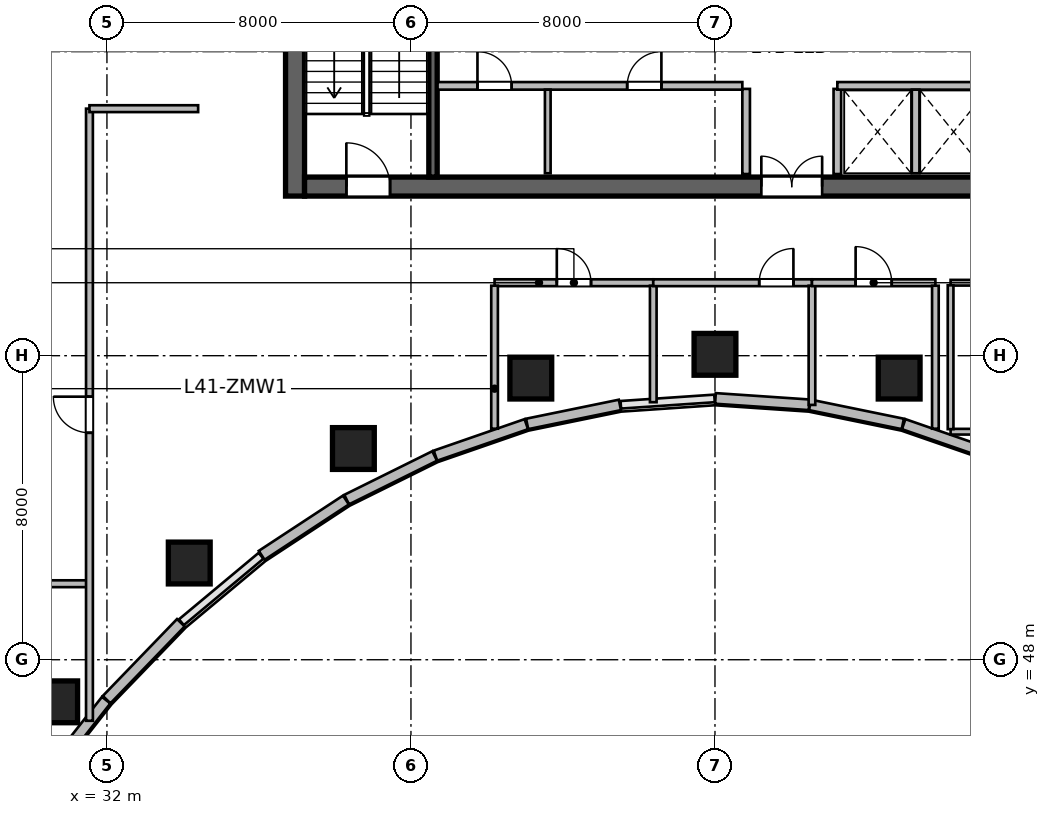
"""IFC4 building model, lengths in metres.
Left out: names, types, materials, properties, quantities, classifications, styles, units other than length and angle.
Written with IfcOpenShell. Run it as: python <this file> out.ifc"""

import sys

from ifc_helpers import new_model, si_unit, direction, frame, frame_2d, origin, origin_2d, place, context, subcontext, project, spatial, rectangle, circle, extrude, source, transform, mapped, element, fill, save


model = new_model("IFC4")
c1 = context("Model", 3, precision=1e-05, world=origin(), true_north=direction((0.0, 1.0)))
c2 = subcontext(c1, "Body", "Model", "MODEL_VIEW")
j1 = project(units=[si_unit("LENGTHUNIT", "METRE"), si_unit("PLANEANGLEUNIT", "RADIAN")], contexts=[c1])
p1 = place(None, origin())
s1 = spatial("IfcSite", under=j1, at=p1, CompositionType="ELEMENT")
p2 = place(p1, origin())
s2 = spatial("IfcBuilding", under=s1, at=p2, CompositionType="ELEMENT")
p3 = place(p2, frame((0.0, 0.0, 170.1)))
s3 = spatial("IfcBuildingStorey", under=s2, at=p3, CompositionType="ELEMENT", Elevation=170.1)
m1 = source(origin(), c2, "Body", "SweptSolid", [
    extrude(rectangle(XDim=12.0, YDim=0.5, at=frame_2d((6.0, 0.0))), origin(), (0.0, 0.0, 1.0), 3.9),
])
p4 = place(p3, frame((36.95, 60.2, 0.0), z_axis=(0.0, 0.0, 1.0), x_axis=(0.0, 1.0, 0.0)))
e1 = element("IfcWall", 1, at=p4, inside=s3, PredefinedType="SHEAR", context=c2, shape_type="MappedRepresentation", body=[
    mapped(m1, transform((0.0, 0.0, 0.0), scale=1.0)),
])
m2 = source(origin(), c2, "Body", "SweptSolid", [
    extrude(rectangle(XDim=21.6, YDim=0.5, at=frame_2d((10.8, 0.0))), origin(), (0.0, 0.0, 1.0), 3.9),
])
p5 = place(p3, frame((37.2, 60.45, 0.0), z_axis=(0.0, 0.0, 1.0), x_axis=(1.0, 0.0, 0.0)))
e2 = element("IfcWall", 2, at=p5, inside=s3, PredefinedType="SHEAR", context=c2, shape_type="MappedRepresentation", body=[
    mapped(m2, transform((0.0, 0.0, 0.0), scale=1.0)),
])
p6 = place(p5, frame((1.1, 0.0, 0.0)))
e3 = element("IfcOpeningElement", 3, at=p6, cuts=e2, PredefinedType="OPENING", context=c2, shape_type="SweptSolid", body=[
    extrude(rectangle(XDim=1.15, YDim=2.15, at=frame_2d((0.575, 1.075))), frame((0.0, 0.26, 0.0), z_axis=(0.0, -1.0, 0.0), x_axis=(1.0, 0.0, 0.0)), (0.0, 0.0, 1.0), 0.52),
])
p7 = place(p5, frame((19.5, 0.0, 0.0)))
e4 = element("IfcOpeningElement", 4, at=p7, cuts=e2, PredefinedType="OPENING", context=c2, shape_type="SweptSolid", body=[
    extrude(rectangle(XDim=0.9, YDim=2.1, at=frame_2d((0.45, 1.05))), frame((0.0, 0.26, 0.0), z_axis=(0.0, -1.0, 0.0), x_axis=(1.0, 0.0, 0.0)), (0.0, 0.0, 1.0), 0.52),
])
p8 = place(p5, frame((12.02, 0.0, 0.0)))
e5 = element("IfcOpeningElement", 5, at=p8, cuts=e2, PredefinedType="OPENING", context=c2, shape_type="SweptSolid", body=[
    extrude(rectangle(XDim=1.6, YDim=2.15, at=frame_2d((0.8, 1.075))), frame((0.0, 0.26, 0.0), z_axis=(0.0, -1.0, 0.0), x_axis=(1.0, 0.0, 0.0)), (0.0, 0.0, 1.0), 0.52),
])
m3 = source(origin(), c2, "Body", "SweptSolid", [
    extrude(rectangle(XDim=11.0, YDim=0.22, at=frame_2d((5.5, 0.0))), origin(), (0.0, 0.0, 1.0), 3.9),
])
p9 = place(p3, frame((40.58, 60.7, 0.0), z_axis=(0.0, 0.0, 1.0), x_axis=(0.0, 1.0, 0.0)))
e6 = element("IfcWall", 6, at=p9, inside=s3, PredefinedType="SHEAR", context=c2, shape_type="MappedRepresentation", body=[
    mapped(m3, transform((0.0, 0.0, 0.0), scale=1.0)),
])
m4 = source(origin(), c2, "Body", "SweptSolid", [
    extrude(circle(Radius=0.55, at=origin_2d()), origin(), (0.0, 0.0, 1.0), 3.9),
])
for number, where, z_axis, x_axis in (
    (7, (30.677, 46.892, 0.0), (0.0, 0.0, 1.0), (-0.571, 0.821, 0.0)),
    (8, (34.166, 50.545, 0.0), (0.0, 0.0, 1.0), (-0.436, 0.9, 0.0)),
    (9, (38.485, 53.558, 0.0), (0.0, 0.0, 1.0), (-0.289, 0.957, 0.0)),
    (10, (43.154, 55.411, 0.0), (0.0, 0.0, 1.0), (-0.143, 0.99, 0.0)),
    (11, (48.0, 56.036, 0.0), (0.0, 0.0, 1.0), (0.0, 1.0, 0.0)),
    (12, (52.846, 55.411, 0.0), (0.0, 0.0, 1.0), (0.143, 0.99, 0.0)),
):
    element("IfcColumn", number, at=place(p3, frame(where, z_axis=z_axis, x_axis=x_axis)), inside=s3, PredefinedType="COLUMN", context=c2, shape_type="MappedRepresentation", body=[
        mapped(m4, transform((0.0, 0.0, 0.0), scale=1.0)),
    ])
m5 = source(origin(), c2, "Body", "SweptSolid", [
    extrude(rectangle(XDim=2.53, YDim=0.28, at=frame_2d((1.265, 0.0))), origin(), (0.0, 0.0, 1.0), 3.65),
])
p10 = place(p3, frame((55.355, 53.37, 0.0), z_axis=(0.0, 0.0, 1.0), x_axis=(-0.944872429646, 0.327438683872, 0.0)))
e13 = element("IfcWall", 13, at=p10, inside=s3, PredefinedType="SOLIDWALL", context=c2, shape_type="MappedRepresentation", body=[
    mapped(m5, transform((0.0, 0.0, 0.0), scale=1.0)),
])
m6 = source(origin(), c2, "Body", "SweptSolid", [
    extrude(rectangle(XDim=2.491, YDim=0.28, at=frame_2d((1.246, 0.0))), origin(), (0.0, 0.0, 1.0), 3.65),
])
p11 = place(p3, frame((52.942, 54.205, 0.0), z_axis=(0.0, 0.0, 1.0), x_axis=(-0.979630885979, 0.200806691214, 0.0)))
e14 = element("IfcWall", 14, at=p11, inside=s3, PredefinedType="SOLIDWALL", context=c2, shape_type="MappedRepresentation", body=[
    mapped(m6, transform((0.0, 0.0, 0.0), scale=1.0)),
])
m7 = source(origin(), c2, "Body", "SweptSolid", [
    extrude(rectangle(XDim=2.471, YDim=0.28, at=frame_2d((1.236, 0.0))), origin(), (0.0, 0.0, 1.0), 3.65),
])
p12 = place(p3, frame((50.478, 54.708, 0.0), z_axis=(0.0, 0.0, 1.0), x_axis=(-0.997708006929, 0.067666335123, 0.0)))
e15 = element("IfcWall", 15, at=p12, inside=s3, PredefinedType="SOLIDWALL", context=c2, shape_type="MappedRepresentation", body=[
    mapped(m7, transform((0.0, 0.0, 0.0), scale=1.0)),
])
p13 = place(p3, frame((45.498, 54.705, 0.0), z_axis=(0.0, 0.0, 1.0), x_axis=(-0.979630885979, -0.200806691214, 0.0)))
e16 = element("IfcWall", 16, at=p13, inside=s3, PredefinedType="SOLIDWALL", context=c2, shape_type="MappedRepresentation", body=[
    mapped(m6, transform((0.0, 0.0, 0.0), scale=1.0)),
])
p14 = place(p3, frame((43.035, 54.198, 0.0), z_axis=(0.0, 0.0, 1.0), x_axis=(-0.944872429646, -0.327438683872, 0.0)))
e17 = element("IfcWall", 17, at=p14, inside=s3, PredefinedType="SOLIDWALL", context=c2, shape_type="MappedRepresentation", body=[
    mapped(m5, transform((0.0, 0.0, 0.0), scale=1.0)),
])
m8 = source(origin(), c2, "Body", "SweptSolid", [
    extrude(rectangle(XDim=2.584, YDim=0.28, at=frame_2d((1.292, 0.0))), origin(), (0.0, 0.0, 1.0), 3.65),
])
p15 = place(p3, frame((40.624, 53.361, 0.0), z_axis=(0.0, 0.0, 1.0), x_axis=(-0.895989792847, -0.44407464588, 0.0)))
e18 = element("IfcWall", 18, at=p15, inside=s3, PredefinedType="SOLIDWALL", context=c2, shape_type="MappedRepresentation", body=[
    mapped(m8, transform((0.0, 0.0, 0.0), scale=1.0)),
])
m9 = source(origin(), c2, "Body", "SweptSolid", [
    extrude(rectangle(XDim=2.652, YDim=0.28, at=frame_2d((1.326, 0.0))), origin(), (0.0, 0.0, 1.0), 3.65),
])
p16 = place(p3, frame((38.289, 52.202, 0.0), z_axis=(0.0, 0.0, 1.0), x_axis=(-0.836008323535, -0.54871676025, 0.0)))
e19 = element("IfcWall", 19, at=p16, inside=s3, PredefinedType="SOLIDWALL", context=c2, shape_type="MappedRepresentation", body=[
    mapped(m9, transform((0.0, 0.0, 0.0), scale=1.0)),
])
m10 = source(origin(), c2, "Body", "SweptSolid", [
    extrude(rectangle(XDim=2.812, YDim=0.28, at=frame_2d((1.406, 0.0))), origin(), (0.0, 0.0, 1.0), 3.65),
])
p17 = place(p3, frame((33.945, 48.973, 0.0), z_axis=(0.0, 0.0, 1.0), x_axis=(-0.694583668785, -0.719411931411, 0.0)))
e20 = element("IfcWall", 20, at=p17, inside=s3, PredefinedType="SOLIDWALL", context=c2, shape_type="MappedRepresentation", body=[
    mapped(m10, transform((0.0, 0.0, 0.0), scale=1.0)),
])
m11 = source(origin(), c2, "Body", "SweptSolid", [
    extrude(rectangle(XDim=2.897, YDim=0.28, at=frame_2d((1.448, 0.0))), origin(), (0.0, 0.0, 1.0), 3.65),
])
p18 = place(p3, frame((31.979, 46.936, 0.0), z_axis=(0.0, 0.0, 1.0), x_axis=(-0.618167636915, -0.786046291685, 0.0)))
e21 = element("IfcWall", 21, at=p18, inside=s3, PredefinedType="SOLIDWALL", context=c2, shape_type="MappedRepresentation", body=[
    mapped(m11, transform((0.0, 0.0, 0.0), scale=1.0)),
])
m12 = source(origin(), c2, "Body", "SweptSolid", [
    extrude(rectangle(XDim=2.24, YDim=0.2, at=frame_2d((1.12, 0.0))), origin(), (0.0, 0.0, 1.0), 3.65),
])
for number, where, z_axis, x_axis in (
    (22, (48.82, 60.78, 0.0), (0.0, 0.0, 1.0), (0.0, 1.0, 0.0)),
    (23, (51.22, 60.78, 0.0), (0.0, 0.0, 1.0), (0.0, 1.0, 0.0)),
):
    element("IfcWall", number, at=place(p3, frame(where, z_axis=z_axis, x_axis=x_axis)), inside=s3, PredefinedType="SOLIDWALL", context=c2, shape_type="MappedRepresentation", body=[
        mapped(m12, transform((0.0, 0.0, 0.0), scale=1.0)),
    ])
m13 = source(origin(), c2, "Body", "SweptSolid", [
    extrude(rectangle(XDim=8.02, YDim=0.2, at=frame_2d((4.01, 0.0))), origin(), (0.0, 0.0, 1.0), 3.65),
])
p19 = place(p3, frame((40.7, 63.1, 0.0), z_axis=(0.0, 0.0, 1.0), x_axis=(1.0, 0.0, 0.0)))
e24 = element("IfcWall", 24, at=p19, inside=s3, PredefinedType="SOLIDWALL", context=c2, shape_type="MappedRepresentation", body=[
    mapped(m13, transform((0.0, 0.0, 0.0), scale=1.0)),
])
p20 = place(p19, frame((1.05, 0.0, 0.0)))
e25 = element("IfcOpeningElement", 25, at=p20, cuts=e24, PredefinedType="OPENING", context=c2, shape_type="SweptSolid", body=[
    extrude(rectangle(XDim=0.9, YDim=2.1, at=frame_2d((0.45, 1.05))), frame((0.0, 0.11, 0.0), z_axis=(0.0, -1.0, 0.0), x_axis=(1.0, 0.0, 0.0)), (0.0, 0.0, 1.0), 0.22),
])
p21 = place(p19, frame((4.99, 0.0, 0.0)))
e26 = element("IfcOpeningElement", 26, at=p21, cuts=e24, PredefinedType="OPENING", context=c2, shape_type="SweptSolid", body=[
    extrude(rectangle(XDim=0.9, YDim=2.1, at=frame_2d((0.45, 1.05))), frame((0.0, 0.11, 0.0), z_axis=(0.0, -1.0, 0.0), x_axis=(1.0, 0.0, 0.0)), (0.0, 0.0, 1.0), 0.22),
])
m14 = source(origin(), c2, "Body", "SweptSolid", [
    extrude(rectangle(XDim=4.1, YDim=0.2, at=frame_2d((2.05, 0.0))), origin(), (0.0, 0.0, 1.0), 3.65),
])
p22 = place(p3, frame((51.22, 63.1, 0.0), z_axis=(0.0, 0.0, 1.0), x_axis=(1.0, 0.0, 0.0)))
e27 = element("IfcWall", 27, at=p22, inside=s3, PredefinedType="SOLIDWALL", context=c2, shape_type="MappedRepresentation", body=[
    mapped(m14, transform((0.0, 0.0, 0.0), scale=1.0)),
])
m15 = source(origin(), c2, "Body", "SweptSolid", [
    extrude(rectangle(XDim=2.2, YDim=0.15, at=frame_2d((1.1, 0.0))), origin(), (0.0, 0.0, 1.0), 3.65),
])
p23 = place(p3, frame((43.6, 60.8, 0.0), z_axis=(0.0, 0.0, 1.0), x_axis=(0.0, 1.0, 0.0)))
e28 = element("IfcWall", 28, at=p23, inside=s3, PredefinedType="PARTITIONING", context=c2, shape_type="MappedRepresentation", body=[
    mapped(m15, transform((0.0, 0.0, 0.0), scale=1.0)),
])
m16 = source(origin(), c2, "Body", "SweptSolid", [
    extrude(rectangle(XDim=2.2, YDim=0.2, at=frame_2d((1.1, 0.0))), origin(), (0.0, 0.0, 1.0), 3.65),
])
p24 = place(p3, frame((53.28, 60.8, 0.0), z_axis=(0.0, 0.0, 1.0), x_axis=(0.0, 1.0, 0.0)))
e29 = element("IfcWall", 29, at=p24, inside=s3, PredefinedType="SOLIDWALL", context=c2, shape_type="MappedRepresentation", body=[
    mapped(m16, transform((0.0, 0.0, 0.0), scale=1.0)),
])
m17 = source(origin(), c2, "Body", "SweptSolid", [
    extrude(rectangle(XDim=4.176, YDim=0.18, at=frame_2d((2.088, 0.0))), origin(), (0.0, 0.0, 1.0), 3.65),
])
p25 = place(p3, frame((42.2, 57.92, 0.0), z_axis=(0.0, 0.0, 1.0), x_axis=(1.0, 0.0, 0.0)))
e30 = element("IfcWall", 30, at=p25, inside=s3, PredefinedType="PLUMBINGWALL", context=c2, shape_type="MappedRepresentation", body=[
    mapped(m17, transform((0.0, 0.0, 0.0), scale=1.0)),
])
p26 = place(p25, frame((1.638, 0.0, 0.0)))
e31 = element("IfcOpeningElement", 31, at=p26, cuts=e30, PredefinedType="OPENING", context=c2, shape_type="SweptSolid", body=[
    extrude(rectangle(XDim=0.9, YDim=2.08, at=frame_2d((0.45, 1.04))), frame((0.0, 0.1, 0.0), z_axis=(0.0, -1.0, 0.0), x_axis=(1.0, 0.0, 0.0)), (0.0, 0.0, 1.0), 0.2),
])
m18 = source(origin(), c2, "Body", "SweptSolid", [
    extrude(rectangle(XDim=3.763, YDim=0.175, at=frame_2d((1.881, 0.0))), origin(), (0.0, 0.0, 1.0), 3.65),
])
p27 = place(p3, frame((42.2, 54.079, 0.0), z_axis=(0.0, 0.0, 1.0), x_axis=(0.0, 1.0, 0.0)))
e32 = element("IfcWall", 32, at=p27, inside=s3, PredefinedType="PARTITIONING", context=c2, shape_type="MappedRepresentation", body=[
    mapped(m18, transform((0.0, 0.0, 0.0), scale=1.0)),
])
m19 = source(origin(), c2, "Body", "SweptSolid", [
    extrude(rectangle(XDim=3.065, YDim=0.175, at=frame_2d((1.533, 0.0))), origin(), (0.0, 0.0, 1.0), 3.65),
])
p28 = place(p3, frame((46.376, 54.776, 0.0), z_axis=(0.0, 0.0, 1.0), x_axis=(0.0, 1.0, 0.0)))
e33 = element("IfcWall", 33, at=p28, inside=s3, PredefinedType="PARTITIONING", context=c2, shape_type="MappedRepresentation", body=[
    mapped(m19, transform((0.0, 0.0, 0.0), scale=1.0)),
])
p29 = place(p3, frame((46.376, 57.92, 0.0), z_axis=(0.0, 0.0, 1.0), x_axis=(1.0, 0.0, 0.0)))
e34 = element("IfcWall", 34, at=p29, inside=s3, PredefinedType="PLUMBINGWALL", context=c2, shape_type="MappedRepresentation", body=[
    mapped(m17, transform((0.0, 0.0, 0.0), scale=1.0)),
])
p30 = place(p29, frame((2.788, 0.0, 0.0)))
e35 = element("IfcOpeningElement", 35, at=p30, cuts=e34, PredefinedType="OPENING", context=c2, shape_type="SweptSolid", body=[
    extrude(rectangle(XDim=0.9, YDim=2.08, at=frame_2d((0.45, 1.04))), frame((0.0, 0.1, 0.0), z_axis=(0.0, -1.0, 0.0), x_axis=(1.0, 0.0, 0.0)), (0.0, 0.0, 1.0), 0.2),
])
m20 = source(origin(), c2, "Body", "SweptSolid", [
    extrude(rectangle(XDim=3.136, YDim=0.175, at=frame_2d((1.568, 0.0))), origin(), (0.0, 0.0, 1.0), 3.65),
])
p31 = place(p3, frame((50.552, 54.705, 0.0), z_axis=(0.0, 0.0, 1.0), x_axis=(0.0, 1.0, 0.0)))
e36 = element("IfcWall", 36, at=p31, inside=s3, PredefinedType="PARTITIONING", context=c2, shape_type="MappedRepresentation", body=[
    mapped(m20, transform((0.0, 0.0, 0.0), scale=1.0)),
])
m21 = source(origin(), c2, "Body", "SweptSolid", [
    extrude(rectangle(XDim=3.248, YDim=0.18, at=frame_2d((1.624, 0.0))), origin(), (0.0, 0.0, 1.0), 3.65),
])
p32 = place(p3, frame((50.552, 57.92, 0.0), z_axis=(0.0, 0.0, 1.0), x_axis=(1.0, 0.0, 0.0)))
e37 = element("IfcWall", 37, at=p32, inside=s3, PredefinedType="PLUMBINGWALL", context=c2, shape_type="MappedRepresentation", body=[
    mapped(m21, transform((0.0, 0.0, 0.0), scale=1.0)),
])
p33 = place(p32, frame((1.149, 0.0, 0.0)))
e38 = element("IfcOpeningElement", 38, at=p33, cuts=e37, PredefinedType="OPENING", context=c2, shape_type="SweptSolid", body=[
    extrude(rectangle(XDim=0.95, YDim=2.12, at=frame_2d((0.475, 1.06))), frame((0.0, 0.1, 0.0), z_axis=(0.0, -1.0, 0.0), x_axis=(1.0, 0.0, 0.0)), (0.0, 0.0, 1.0), 0.2),
])
p34 = place(p3, frame((53.8, 54.079, 0.0), z_axis=(0.0, 0.0, 1.0), x_axis=(0.0, 1.0, 0.0)))
e39 = element("IfcWall", 39, at=p34, inside=s3, PredefinedType="PARTITIONING", context=c2, shape_type="MappedRepresentation", body=[
    mapped(m18, transform((0.0, 0.0, 0.0), scale=1.0)),
])
m22 = source(origin(), c2, "Body", "SweptSolid", [
    extrude(rectangle(XDim=6.6, YDim=0.15, at=frame_2d((3.3, 0.0))), origin(), (0.0, 0.0, 1.0), 3.095),
])
p35 = place(p3, frame((54.2, 54.0, 0.0), z_axis=(0.0, 0.0, 1.0), x_axis=(1.0, 0.0, 0.0)))
e40 = element("IfcWall", 40, at=p35, inside=s3, PredefinedType="PARTITIONING", context=c2, shape_type="MappedRepresentation", body=[
    mapped(m22, transform((0.0, 0.0, 0.0), scale=1.0)),
])
m23 = source(origin(), c2, "Body", "SweptSolid", [
    extrude(rectangle(XDim=6.6, YDim=0.15, at=frame_2d((3.3, 0.0))), origin(), (0.0, 0.0, 1.0), 3.65),
])
p36 = place(p3, frame((54.2, 57.92, 0.0), z_axis=(0.0, 0.0, 1.0), x_axis=(1.0, 0.0, 0.0)))
e41 = element("IfcWall", 41, at=p36, inside=s3, PredefinedType="PARTITIONING", context=c2, shape_type="MappedRepresentation", body=[
    mapped(m23, transform((0.0, 0.0, 0.0), scale=1.0)),
])
p37 = place(p36, frame((2.825, 0.0, 0.0)))
e42 = element("IfcOpeningElement", 42, at=p37, cuts=e41, PredefinedType="OPENING", context=c2, shape_type="SweptSolid", body=[
    extrude(rectangle(XDim=0.95, YDim=2.1, at=frame_2d((0.475, 1.05))), frame((0.0, 0.085, 0.0), z_axis=(0.0, -1.0, 0.0), x_axis=(1.0, 0.0, 0.0)), (0.0, 0.0, 1.0), 0.17),
])
m24 = source(origin(), c2, "Body", "SweptSolid", [
    extrude(rectangle(XDim=3.785, YDim=0.15, at=frame_2d((1.893, 0.0))), origin(), (0.0, 0.0, 1.0), 3.65),
])
p38 = place(p3, frame((54.2, 54.067, 0.0), z_axis=(0.0, 0.0, 1.0), x_axis=(0.0, 1.0, 0.0)))
e43 = element("IfcWall", 43, at=p38, inside=s3, PredefinedType="PARTITIONING", context=c2, shape_type="MappedRepresentation", body=[
    mapped(m24, transform((0.0, 0.0, 0.0), scale=1.0)),
])
m25 = source(origin(), c2, "Body", "SweptSolid", [
    extrude(rectangle(XDim=2.5, YDim=0.18, at=frame_2d((1.25, 0.0))), origin(), (0.0, 0.0, 1.0), 3.65),
])
p39 = place(p3, frame((29.0, 50.0, 0.0), z_axis=(0.0, 0.0, 1.0), x_axis=(1.0, 0.0, 0.0)))
e44 = element("IfcWall", 44, at=p39, inside=s3, PredefinedType="PLUMBINGWALL", context=c2, shape_type="MappedRepresentation", body=[
    mapped(m25, transform((0.0, 0.0, 0.0), scale=1.0)),
])
m26 = source(origin(), c2, "Body", "SweptSolid", [
    extrude(rectangle(XDim=16.106, YDim=0.18, at=frame_2d((8.053, 0.0))), origin(), (0.0, 0.0, 1.0), 2.942),
])
p40 = place(p3, frame((31.54, 46.394, 0.0), z_axis=(0.0, 0.0, 1.0), x_axis=(0.0, 1.0, 0.0)))
e45 = element("IfcWall", 45, at=p40, inside=s3, PredefinedType="PLUMBINGWALL", context=c2, shape_type="MappedRepresentation", body=[
    mapped(m26, transform((0.0, 0.0, 0.0), scale=1.0)),
])
p41 = place(p40, frame((7.578, 0.0, 0.0)))
e46 = element("IfcOpeningElement", 46, at=p41, cuts=e45, PredefinedType="OPENING", context=c2, shape_type="SweptSolid", body=[
    extrude(rectangle(XDim=0.95, YDim=2.1, at=frame_2d((0.475, 1.05))), frame((0.0, 0.1, 0.0), z_axis=(0.0, -1.0, 0.0), x_axis=(1.0, 0.0, 0.0)), (0.0, 0.0, 1.0), 0.2),
])
m27 = source(origin(), c2, "Body", "SweptSolid", [
    extrude(rectangle(XDim=2.86, YDim=0.18, at=frame_2d((1.43, 0.0))), origin(), (0.0, 0.0, 1.0), 3.65),
])
p42 = place(p3, frame((31.54, 62.5, 0.0), z_axis=(0.0, 0.0, 1.0), x_axis=(1.0, 0.0, 0.0)))
e47 = element("IfcWall", 47, at=p42, inside=s3, PredefinedType="PLUMBINGWALL", context=c2, shape_type="MappedRepresentation", body=[
    mapped(m27, transform((0.0, 0.0, 0.0), scale=1.0)),
])
m28 = source(origin(), c2, "Body", "SweptSolid", [
    extrude(rectangle(XDim=1.15, YDim=2.15, at=frame_2d((0.575, 1.075))), frame((0.0, 0.025, 0.0), z_axis=(0.0, -1.0, 0.0), x_axis=(1.0, 0.0, 0.0)), (0.0, 0.0, 1.0), 0.05),
])
p43 = place(p6, origin())
e48 = element("IfcDoor", 48, at=p43, inside=s3, OperationType="SINGLE_SWING_LEFT", PredefinedType="DOOR", context=c2, shape_type="MappedRepresentation", body=[
    mapped(m28, transform((0.0, 0.0, 0.0), scale=1.0)),
])
fill(e3, e48)
m29 = source(origin(), c2, "Body", "SweptSolid", [
    extrude(rectangle(XDim=1.6, YDim=2.15, at=frame_2d((0.8, 1.075))), frame((0.0, 0.025, 0.0), z_axis=(0.0, -1.0, 0.0), x_axis=(1.0, 0.0, 0.0)), (0.0, 0.0, 1.0), 0.05),
])
p44 = place(p8, origin())
e49 = element("IfcDoor", 49, at=p44, inside=s3, OperationType="DOUBLE_DOOR_SINGLE_SWING", PredefinedType="DOOR", context=c2, shape_type="MappedRepresentation", body=[
    mapped(m29, transform((0.0, 0.0, 0.0), scale=1.0)),
])
fill(e5, e49)
m30 = source(origin(), c2, "Body", "SweptSolid", [
    extrude(rectangle(XDim=0.9, YDim=2.1, at=frame_2d((0.45, 1.05))), frame((0.0, 0.025, 0.0), z_axis=(0.0, -1.0, 0.0), x_axis=(1.0, 0.0, 0.0)), (0.0, 0.0, 1.0), 0.05),
])
p45 = place(p20, origin())
e50 = element("IfcDoor", 50, at=p45, inside=s3, OperationType="SINGLE_SWING_LEFT", PredefinedType="DOOR", context=c2, shape_type="MappedRepresentation", body=[
    mapped(m30, transform((0.0, 0.0, 0.0), scale=1.0)),
])
fill(e25, e50)
p46 = place(p21, origin())
e51 = element("IfcDoor", 51, at=p46, inside=s3, OperationType="SINGLE_SWING_RIGHT", PredefinedType="DOOR", context=c2, shape_type="MappedRepresentation", body=[
    mapped(m30, transform((0.0, 0.0, 0.0), scale=1.0)),
])
fill(e26, e51)
m31 = source(origin(), c2, "Body", "SweptSolid", [
    extrude(rectangle(XDim=0.9, YDim=2.08, at=frame_2d((0.45, 1.04))), frame((0.0, 0.025, 0.0), z_axis=(0.0, -1.0, 0.0), x_axis=(1.0, 0.0, 0.0)), (0.0, 0.0, 1.0), 0.05),
])
p47 = place(p26, origin())
e52 = element("IfcDoor", 52, at=p47, inside=s3, OperationType="SINGLE_SWING_LEFT", PredefinedType="DOOR", context=c2, shape_type="MappedRepresentation", body=[
    mapped(m31, transform((0.0, 0.0, 0.0), scale=1.0)),
])
fill(e31, e52)
p48 = place(p30, origin())
e53 = element("IfcDoor", 53, at=p48, inside=s3, OperationType="SINGLE_SWING_RIGHT", PredefinedType="DOOR", context=c2, shape_type="MappedRepresentation", body=[
    mapped(m31, transform((0.0, 0.0, 0.0), scale=1.0)),
])
fill(e35, e53)
m32 = source(origin(), c2, "Body", "SweptSolid", [
    extrude(rectangle(XDim=0.95, YDim=2.12, at=frame_2d((0.475, 1.06))), frame((0.0, 0.025, 0.0), z_axis=(0.0, -1.0, 0.0), x_axis=(1.0, 0.0, 0.0)), (0.0, 0.0, 1.0), 0.05),
])
p49 = place(p33, origin())
e54 = element("IfcDoor", 54, at=p49, inside=s3, OperationType="SINGLE_SWING_LEFT", PredefinedType="DOOR", context=c2, shape_type="MappedRepresentation", body=[
    mapped(m32, transform((0.0, 0.0, 0.0), scale=1.0)),
])
fill(e38, e54)
m33 = source(origin(), c2, "Body", "SweptSolid", [
    extrude(rectangle(XDim=0.95, YDim=2.1, at=frame_2d((0.475, 1.05))), frame((0.0, 0.025, 0.0), z_axis=(0.0, -1.0, 0.0), x_axis=(1.0, 0.0, 0.0)), (0.0, 0.0, 1.0), 0.05),
])
p50 = place(p41, origin())
e55 = element("IfcDoor", 55, at=p50, inside=s3, OperationType="SINGLE_SWING_RIGHT", PredefinedType="DOOR", context=c2, shape_type="MappedRepresentation", body=[
    mapped(m33, transform((0.0, 0.0, 0.0), scale=1.0)),
])
fill(e46, e55)
save(model, sys.argv[1])
